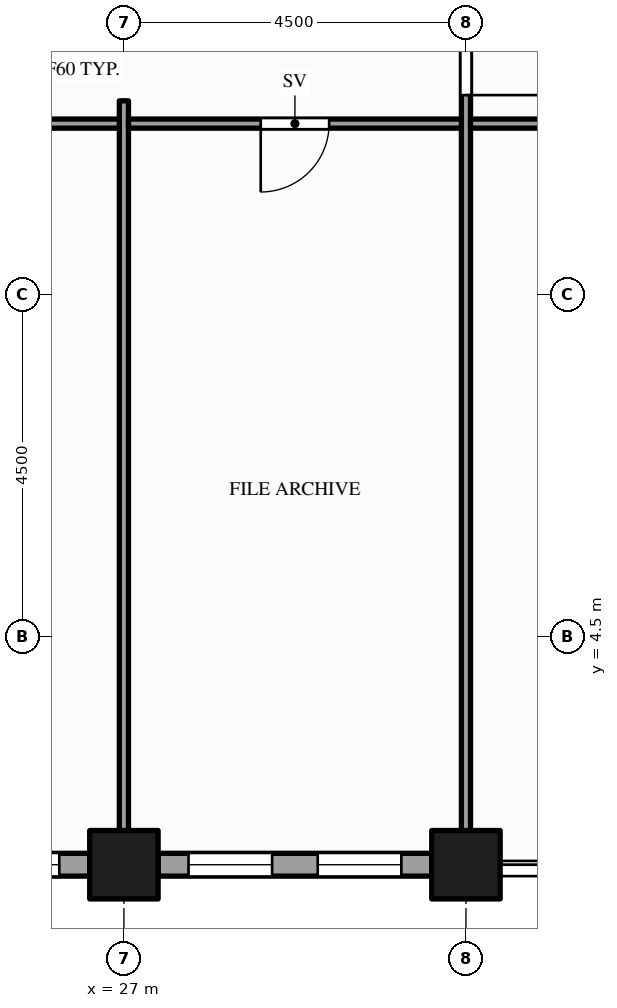
"""IFC4 building model, lengths in metres.
Left out: names, types, materials, properties, quantities, classifications, styles, units other than length and angle.
Written with IfcOpenShell. Run it as: python <this file> out.ifc"""

import sys

from ifc_helpers import new_model, si_unit, direction, frame, frame_2d, origin, origin_2d, place, context, subcontext, project, spatial, rectangle, hollow_rectangle, extrude, element, fill, save


model = new_model("IFC4")
c1 = context("Model", 3, precision=1e-05, world=origin(), true_north=direction((0.0, 1.0)))
c2 = subcontext(c1, "Body", "Model", "MODEL_VIEW")
j1 = project(units=[si_unit("LENGTHUNIT", "METRE"), si_unit("PLANEANGLEUNIT", "RADIAN")], contexts=[c1])
p1 = place(None, origin())
s1 = spatial("IfcSite", under=j1, at=p1, CompositionType="ELEMENT")
p2 = place(p1, origin())
s2 = spatial("IfcBuilding", under=s1, at=p2, CompositionType="ELEMENT")
p3 = place(p2, frame((0.0, 0.0, 155.0)))
s3 = spatial("IfcBuildingStorey", under=s2, at=p3, CompositionType="ELEMENT", Elevation=155.0)
for number, where, z_axis, x_axis in (
    (1, (27.0, 1.5, -0.15), (0.0, 0.0, 1.0), (1.0, 0.0, 0.0)),
    (2, (31.5, 1.5, -0.15), (0.0, 0.0, 1.0), (1.0, 0.0, 0.0)),
):
    element("IfcColumn", number, at=place(p3, frame(where, z_axis=z_axis, x_axis=x_axis)), inside=s3, PredefinedType="COLUMN", context=c2, shape_type="SweptSolid", body=[
        extrude(hollow_rectangle(XDim=0.9, YDim=0.9, WallThickness=0.045, at=origin_2d()), origin(), (0.0, 0.0, 1.0), 4.0),
    ])
p4 = place(p3, frame((22.95, 1.5, 0.0), z_axis=(0.0, 0.0, 1.0), x_axis=(1.0, 0.0, 0.0)))
e3 = element("IfcWall", 3, at=p4, inside=s3, PredefinedType="STANDARD", context=c2, shape_type="SweptSolid", body=[
    extrude(rectangle(XDim=3.6, YDim=0.3, at=frame_2d((1.8, 0.0))), origin(), (0.0, 0.0, 1.0), 2.87),
])
p5 = place(p4, frame((0.4, 0.0, 0.9)))
e4 = element("IfcOpeningElement", 4, at=p5, cuts=e3, PredefinedType="OPENING", context=c2, shape_type="SweptSolid", body=[
    extrude(rectangle(XDim=1.1, YDim=1.75, at=frame_2d((0.55, 0.875))), frame((0.0, 0.16, 0.0), z_axis=(0.0, -1.0, 0.0), x_axis=(1.0, 0.0, 0.0)), (0.0, 0.0, 1.0), 0.32),
])
p6 = place(p4, frame((2.1, 0.0, 0.9)))
e5 = element("IfcOpeningElement", 5, at=p6, cuts=e3, PredefinedType="OPENING", context=c2, shape_type="SweptSolid", body=[
    extrude(rectangle(XDim=1.1, YDim=1.75, at=frame_2d((0.55, 0.875))), frame((0.0, 0.16, 0.0), z_axis=(0.0, -1.0, 0.0), x_axis=(1.0, 0.0, 0.0)), (0.0, 0.0, 1.0), 0.32),
])
p7 = place(p3, frame((27.45, 1.5, 0.0), z_axis=(0.0, 0.0, 1.0), x_axis=(1.0, 0.0, 0.0)))
e6 = element("IfcWall", 6, at=p7, inside=s3, PredefinedType="STANDARD", context=c2, shape_type="SweptSolid", body=[
    extrude(rectangle(XDim=3.6, YDim=0.3, at=frame_2d((1.8, 0.0))), origin(), (0.0, 0.0, 1.0), 2.87),
])
p8 = place(p7, frame((0.4, 0.0, 0.9)))
e7 = element("IfcOpeningElement", 7, at=p8, cuts=e6, PredefinedType="OPENING", context=c2, shape_type="SweptSolid", body=[
    extrude(rectangle(XDim=1.1, YDim=1.75, at=frame_2d((0.55, 0.875))), frame((0.0, 0.16, 0.0), z_axis=(0.0, -1.0, 0.0), x_axis=(1.0, 0.0, 0.0)), (0.0, 0.0, 1.0), 0.32),
])
p9 = place(p7, frame((2.1, 0.0, 0.9)))
e8 = element("IfcOpeningElement", 8, at=p9, cuts=e6, PredefinedType="OPENING", context=c2, shape_type="SweptSolid", body=[
    extrude(rectangle(XDim=1.1, YDim=1.75, at=frame_2d((0.55, 0.875))), frame((0.0, 0.16, 0.0), z_axis=(0.0, -1.0, 0.0), x_axis=(1.0, 0.0, 0.0)), (0.0, 0.0, 1.0), 0.32),
])
p10 = place(p3, frame((27.0, 1.65, 0.0), z_axis=(0.0, 0.0, 1.0), x_axis=(0.0, 1.0, 0.0)))
e9 = element("IfcWall", 9, at=p10, inside=s3, PredefinedType="PARTITIONING", context=c2, shape_type="SweptSolid", body=[
    extrude(rectangle(XDim=9.9, YDim=0.12, at=frame_2d((4.95, 0.0))), origin(), (0.0, 0.0, 1.0), 2.87),
])
p11 = place(p3, frame((31.5, 1.65, 0.0), z_axis=(0.0, 0.0, 1.0), x_axis=(0.0, 1.0, 0.0)))
e10 = element("IfcWall", 10, at=p11, inside=s3, PredefinedType="PARTITIONING", context=c2, shape_type="SweptSolid", body=[
    extrude(rectangle(XDim=22.2, YDim=0.12, at=frame_2d((11.1, 0.0))), origin(), (0.0, 0.0, 1.0), 2.87),
])
p12 = place(p11, frame((9.975, 0.0, 0.0)))
e11 = element("IfcOpeningElement", 11, at=p12, cuts=e10, PredefinedType="OPENING", context=c2, shape_type="SweptSolid", body=[
    extrude(rectangle(XDim=1.5, YDim=2.1, at=frame_2d((0.75, 1.05))), frame((0.0, 0.07, 0.0), z_axis=(0.0, -1.0, 0.0), x_axis=(1.0, 0.0, 0.0)), (0.0, 0.0, 1.0), 0.14),
])
p13 = place(p3, frame((22.56, 11.25, 0.0), z_axis=(0.0, 0.0, 1.0), x_axis=(1.0, 0.0, 0.0)))
e12 = element("IfcWall", 12, at=p13, inside=s3, PredefinedType="PARTITIONING", context=c2, shape_type="SweptSolid", body=[
    extrude(rectangle(XDim=4.38, YDim=0.12, at=frame_2d((2.19, 0.0))), origin(), (0.0, 0.0, 1.0), 2.87),
])
p14 = place(p13, frame((1.74, 0.0, 0.0)))
e13 = element("IfcOpeningElement", 13, at=p14, cuts=e12, PredefinedType="OPENING", context=c2, shape_type="SweptSolid", body=[
    extrude(rectangle(XDim=0.9, YDim=2.1, at=frame_2d((0.45, 1.05))), frame((0.0, 0.07, 0.0), z_axis=(0.0, -1.0, 0.0), x_axis=(1.0, 0.0, 0.0)), (0.0, 0.0, 1.0), 0.14),
])
p15 = place(p3, frame((27.06, 11.25, 0.0), z_axis=(0.0, 0.0, 1.0), x_axis=(1.0, 0.0, 0.0)))
e14 = element("IfcWall", 14, at=p15, inside=s3, PredefinedType="PARTITIONING", context=c2, shape_type="SweptSolid", body=[
    extrude(rectangle(XDim=4.38, YDim=0.12, at=frame_2d((2.19, 0.0))), origin(), (0.0, 0.0, 1.0), 2.87),
])
p16 = place(p15, frame((1.74, 0.0, 0.0)))
e15 = element("IfcOpeningElement", 15, at=p16, cuts=e14, PredefinedType="OPENING", context=c2, shape_type="SweptSolid", body=[
    extrude(rectangle(XDim=0.9, YDim=2.1, at=frame_2d((0.45, 1.05))), frame((0.0, 0.07, 0.0), z_axis=(0.0, -1.0, 0.0), x_axis=(1.0, 0.0, 0.0)), (0.0, 0.0, 1.0), 0.14),
])
p17 = place(p3, frame((31.56, 11.25, 0.0), z_axis=(0.0, 0.0, 1.0), x_axis=(1.0, 0.0, 0.0)))
e16 = element("IfcWall", 16, at=p17, inside=s3, PredefinedType="PARTITIONING", context=c2, shape_type="SweptSolid", body=[
    extrude(rectangle(XDim=6.63, YDim=0.12, at=frame_2d((3.315, 0.0))), origin(), (0.0, 0.0, 1.0), 2.87),
])
p18 = place(p17, frame((2.815, 0.0, 0.0)))
e17 = element("IfcOpeningElement", 17, at=p18, cuts=e16, PredefinedType="OPENING", context=c2, shape_type="SweptSolid", body=[
    extrude(rectangle(XDim=1.0, YDim=2.1, at=frame_2d((0.5, 1.05))), frame((0.0, 0.07, 0.0), z_axis=(0.0, -1.0, 0.0), x_axis=(1.0, 0.0, 0.0)), (0.0, 0.0, 1.0), 0.14),
])
p19 = place(p6, origin())
e18 = element("IfcWindow", 18, at=p19, inside=s3, PartitioningType="SINGLE_PANEL", PredefinedType="WINDOW", context=c2, shape_type="SweptSolid", body=[
    extrude(rectangle(XDim=1.1, YDim=1.75, at=frame_2d((0.55, 0.875))), frame((0.0, 0.03, 0.0), z_axis=(0.0, -1.0, 0.0), x_axis=(1.0, 0.0, 0.0)), (0.0, 0.0, 1.0), 0.06),
])
fill(e5, e18)
p20 = place(p8, origin())
e19 = element("IfcWindow", 19, at=p20, inside=s3, PartitioningType="SINGLE_PANEL", PredefinedType="WINDOW", context=c2, shape_type="SweptSolid", body=[
    extrude(rectangle(XDim=1.1, YDim=1.75, at=frame_2d((0.55, 0.875))), frame((0.0, 0.03, 0.0), z_axis=(0.0, -1.0, 0.0), x_axis=(1.0, 0.0, 0.0)), (0.0, 0.0, 1.0), 0.06),
])
fill(e7, e19)
p21 = place(p9, origin())
e20 = element("IfcWindow", 20, at=p21, inside=s3, PartitioningType="SINGLE_PANEL", PredefinedType="WINDOW", context=c2, shape_type="SweptSolid", body=[
    extrude(rectangle(XDim=1.1, YDim=1.75, at=frame_2d((0.55, 0.875))), frame((0.0, 0.03, 0.0), z_axis=(0.0, -1.0, 0.0), x_axis=(1.0, 0.0, 0.0)), (0.0, 0.0, 1.0), 0.06),
])
fill(e8, e20)
p22 = place(p12, origin())
e21 = element("IfcDoor", 21, at=p22, inside=s3, OperationType="SINGLE_SWING_LEFT", PredefinedType="DOOR", context=c2, shape_type="SweptSolid", body=[
    extrude(rectangle(XDim=1.5, YDim=2.1, at=frame_2d((0.75, 1.05))), frame((0.0, 0.025, 0.0), z_axis=(0.0, -1.0, 0.0), x_axis=(1.0, 0.0, 0.0)), (0.0, 0.0, 1.0), 0.05),
])
fill(e11, e21)
p23 = place(p16, origin())
e22 = element("IfcDoor", 22, at=p23, inside=s3, OperationType="SINGLE_SWING_LEFT", PredefinedType="DOOR", context=c2, shape_type="SweptSolid", body=[
    extrude(rectangle(XDim=0.9, YDim=2.1, at=frame_2d((0.45, 1.05))), frame((0.0, 0.025, 0.0), z_axis=(0.0, -1.0, 0.0), x_axis=(1.0, 0.0, 0.0)), (0.0, 0.0, 1.0), 0.05),
])
fill(e15, e22)
save(model, sys.argv[1])
